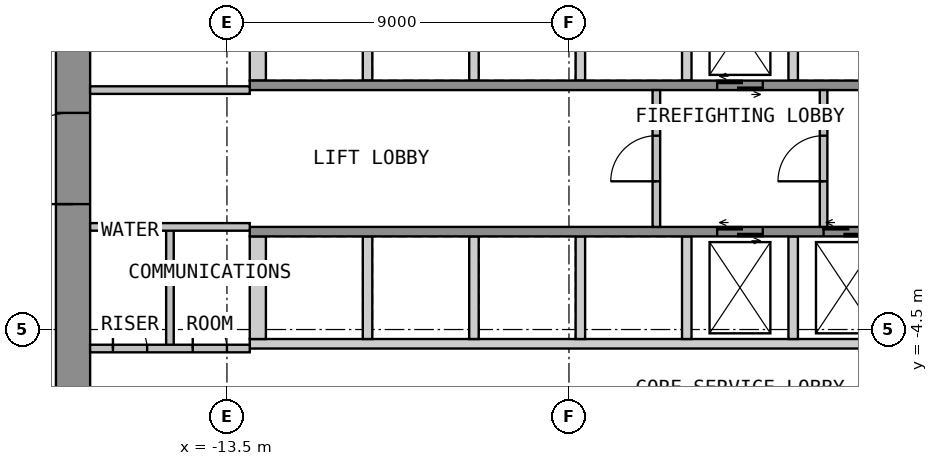
"""IFC4 building model, lengths in metres.
Left out: names, types, materials, properties, quantities, classifications, styles, units other than length and angle.
Written with IfcOpenShell. Run it as: python <this file> out.ifc"""

import sys

from ifc_helpers import new_model, si_unit, direction, frame, frame_2d, origin, place, context, subcontext, project, spatial, polyline, rectangle, outline, extrude, element, fill, save


model = new_model("IFC4")
c1 = context("Model", 3, precision=1e-05, world=origin(), true_north=direction((0.0, 1.0)))
c2 = subcontext(c1, "Body", "Model", "MODEL_VIEW")
j1 = project(units=[si_unit("LENGTHUNIT", "METRE"), si_unit("PLANEANGLEUNIT", "RADIAN")], contexts=[c1])
p1 = place(None, origin())
s1 = spatial("IfcSite", under=j1, at=p1, CompositionType="ELEMENT")
p2 = place(p1, origin())
s2 = spatial("IfcBuilding", under=s1, at=p2, CompositionType="ELEMENT")
p3 = place(p2, frame((0.0, 0.0, -5.0)))
s3 = spatial("IfcBuildingStorey", under=s2, at=p3, CompositionType="ELEMENT", Elevation=-5.0)
p4 = place(p3, frame((-17.55, -12.6, 0.0), z_axis=(0.0, 0.0, 1.0), x_axis=(0.0, 1.0, 0.0)))
e1 = element("IfcWall", 1, at=p4, inside=s3, PredefinedType="SHEAR", context=c2, shape_type="SweptSolid", body=[
    extrude(rectangle(XDim=25.2, YDim=0.9, at=frame_2d((12.6, 0.0))), origin(), (0.0, 0.0, 1.0), 4.55),
])
p5 = place(p4, frame((11.4, 0.0, 0.0)))
e2 = element("IfcOpeningElement", 2, at=p5, cuts=e1, PredefinedType="OPENING", context=c2, shape_type="SweptSolid", body=[
    extrude(rectangle(XDim=2.4, YDim=2.1, at=frame_2d((1.2, 1.05))), frame((0.0, 0.46, 0.0), z_axis=(0.0, -1.0, 0.0), x_axis=(1.0, 0.0, 0.0)), (0.0, 0.0, 1.0), 0.92),
])
p6 = place(p3, origin())
e3 = element("IfcWall", 3, at=p6, inside=s3, PredefinedType="SHEAR", context=c2, shape_type="SweptSolid", body=[
    extrude(outline(polyline([(-12.9, 2.05), (-12.475, 2.05), (-12.475, 4.75), (-12.9, 4.75), (-12.9, 2.05)])), origin(), (0.0, 0.0, 1.0), 4.55),
])
p7 = place(p3, origin())
e4 = element("IfcWall", 4, at=p7, inside=s3, PredefinedType="SHEAR", context=c2, shape_type="SweptSolid", body=[
    extrude(outline(polyline([(-9.925, 2.05), (-9.675, 2.05), (-9.675, 4.75), (-9.925, 4.75), (-9.925, 2.05)])), origin(), (0.0, 0.0, 1.0), 4.55),
])
p8 = place(p3, origin())
e5 = element("IfcWall", 5, at=p8, inside=s3, PredefinedType="SHEAR", context=c2, shape_type="SweptSolid", body=[
    extrude(outline(polyline([(-7.125, 2.05), (-6.875, 2.05), (-6.875, 4.75), (-7.125, 4.75), (-7.125, 2.05)])), origin(), (0.0, 0.0, 1.0), 4.55),
])
p9 = place(p3, origin())
e6 = element("IfcWall", 6, at=p9, inside=s3, PredefinedType="SHEAR", context=c2, shape_type="SweptSolid", body=[
    extrude(outline(polyline([(-4.325, 2.05), (-4.075, 2.05), (-4.075, 4.75), (-4.325, 4.75), (-4.325, 2.05)])), origin(), (0.0, 0.0, 1.0), 4.55),
])
p10 = place(p3, origin())
e7 = element("IfcWall", 7, at=p10, inside=s3, PredefinedType="SHEAR", context=c2, shape_type="SweptSolid", body=[
    extrude(outline(polyline([(-1.525, 2.05), (-1.275, 2.05), (-1.275, 4.75), (-1.525, 4.75), (-1.525, 2.05)])), origin(), (0.0, 0.0, 1.0), 4.55),
])
p11 = place(p3, origin())
e8 = element("IfcWall", 8, at=p11, inside=s3, PredefinedType="SHEAR", context=c2, shape_type="SweptSolid", body=[
    extrude(outline(polyline([(1.275, 2.05), (1.525, 2.05), (1.525, 4.75), (1.275, 4.75), (1.275, 2.05)])), origin(), (0.0, 0.0, 1.0), 4.55),
])
p12 = place(p3, frame((-12.9, 1.925, 0.0), z_axis=(0.0, 0.0, 1.0), x_axis=(1.0, 0.0, 0.0)))
e9 = element("IfcWall", 9, at=p12, inside=s3, PredefinedType="SHEAR", context=c2, shape_type="SweptSolid", body=[
    extrude(rectangle(XDim=25.8, YDim=0.25, at=frame_2d((12.9, 0.0))), origin(), (0.0, 0.0, 1.0), 4.55),
])
p13 = place(p12, frame((12.3, 0.0, 0.0)))
e10 = element("IfcOpeningElement", 10, at=p13, cuts=e9, PredefinedType="OPENING", context=c2, shape_type="SweptSolid", body=[
    extrude(rectangle(XDim=1.2, YDim=2.1, at=frame_2d((0.6, 1.05))), frame((0.0, 0.135, 0.0), z_axis=(0.0, -1.0, 0.0), x_axis=(1.0, 0.0, 0.0)), (0.0, 0.0, 1.0), 0.27),
])
p14 = place(p12, frame((23.5, 0.0, 0.0)))
e11 = element("IfcOpeningElement", 11, at=p14, cuts=e9, PredefinedType="OPENING", context=c2, shape_type="SweptSolid", body=[
    extrude(rectangle(XDim=1.2, YDim=2.1, at=frame_2d((0.6, 1.05))), frame((0.0, 0.135, 0.0), z_axis=(0.0, -1.0, 0.0), x_axis=(1.0, 0.0, 0.0)), (0.0, 0.0, 1.0), 0.27),
])
p15 = place(p3, origin())
e12 = element("IfcWall", 12, at=p15, inside=s3, PredefinedType="SHEAR", context=c2, shape_type="SweptSolid", body=[
    extrude(outline(polyline([(-12.9, -5.0), (12.9, -5.0), (12.9, -4.75), (-12.9, -4.75), (-12.9, -5.0)])), origin(), (0.0, 0.0, 1.0), 4.55),
])
p16 = place(p3, origin())
e13 = element("IfcWall", 13, at=p16, inside=s3, PredefinedType="SHEAR", context=c2, shape_type="SweptSolid", body=[
    extrude(outline(polyline([(-12.9, -4.75), (-12.475, -4.75), (-12.475, -2.05), (-12.9, -2.05), (-12.9, -4.75)])), origin(), (0.0, 0.0, 1.0), 4.55),
])
p17 = place(p3, origin())
e14 = element("IfcWall", 14, at=p17, inside=s3, PredefinedType="SHEAR", context=c2, shape_type="SweptSolid", body=[
    extrude(outline(polyline([(-9.925, -4.75), (-9.675, -4.75), (-9.675, -2.05), (-9.925, -2.05), (-9.925, -4.75)])), origin(), (0.0, 0.0, 1.0), 4.55),
])
p18 = place(p3, origin())
e15 = element("IfcWall", 15, at=p18, inside=s3, PredefinedType="SHEAR", context=c2, shape_type="SweptSolid", body=[
    extrude(outline(polyline([(-7.125, -4.75), (-6.875, -4.75), (-6.875, -2.05), (-7.125, -2.05), (-7.125, -4.75)])), origin(), (0.0, 0.0, 1.0), 4.55),
])
p19 = place(p3, origin())
e16 = element("IfcWall", 16, at=p19, inside=s3, PredefinedType="SHEAR", context=c2, shape_type="SweptSolid", body=[
    extrude(outline(polyline([(-4.325, -4.75), (-4.075, -4.75), (-4.075, -2.05), (-4.325, -2.05), (-4.325, -4.75)])), origin(), (0.0, 0.0, 1.0), 4.55),
])
p20 = place(p3, origin())
e17 = element("IfcWall", 17, at=p20, inside=s3, PredefinedType="SHEAR", context=c2, shape_type="SweptSolid", body=[
    extrude(outline(polyline([(-1.525, -4.75), (-1.275, -4.75), (-1.275, -2.05), (-1.525, -2.05), (-1.525, -4.75)])), origin(), (0.0, 0.0, 1.0), 4.55),
])
p21 = place(p3, origin())
e18 = element("IfcWall", 18, at=p21, inside=s3, PredefinedType="SHEAR", context=c2, shape_type="SweptSolid", body=[
    extrude(outline(polyline([(1.275, -4.75), (1.525, -4.75), (1.525, -2.05), (1.275, -2.05), (1.275, -4.75)])), origin(), (0.0, 0.0, 1.0), 4.55),
])
p22 = place(p3, frame((-12.9, -1.925, 0.0), z_axis=(0.0, 0.0, 1.0), x_axis=(1.0, 0.0, 0.0)))
e19 = element("IfcWall", 19, at=p22, inside=s3, PredefinedType="SHEAR", context=c2, shape_type="SweptSolid", body=[
    extrude(rectangle(XDim=25.8, YDim=0.25, at=frame_2d((12.9, 0.0))), origin(), (0.0, 0.0, 1.0), 4.55),
])
p23 = place(p22, frame((12.3, 0.0, 0.0)))
e20 = element("IfcOpeningElement", 20, at=p23, cuts=e19, PredefinedType="OPENING", context=c2, shape_type="SweptSolid", body=[
    extrude(rectangle(XDim=1.2, YDim=2.1, at=frame_2d((0.6, 1.05))), frame((0.0, 0.135, 0.0), z_axis=(0.0, -1.0, 0.0), x_axis=(1.0, 0.0, 0.0)), (0.0, 0.0, 1.0), 0.27),
])
p24 = place(p22, frame((15.1, 0.0, 0.0)))
e21 = element("IfcOpeningElement", 21, at=p24, cuts=e19, PredefinedType="OPENING", context=c2, shape_type="SweptSolid", body=[
    extrude(rectangle(XDim=1.2, YDim=2.1, at=frame_2d((0.6, 1.05))), frame((0.0, 0.135, 0.0), z_axis=(0.0, -1.0, 0.0), x_axis=(1.0, 0.0, 0.0)), (0.0, 0.0, 1.0), 0.27),
])
p25 = place(p3, frame((-2.2, -1.8, 0.0), z_axis=(0.0, 0.0, 1.0), x_axis=(0.0, 1.0, 0.0)))
e22 = element("IfcWall", 22, at=p25, inside=s3, PredefinedType="PARTITIONING", context=c2, shape_type="SweptSolid", body=[
    extrude(rectangle(XDim=3.6, YDim=0.2, at=frame_2d((1.8, 0.0))), origin(), (0.0, 0.0, 1.0), 4.55),
])
p26 = place(p25, frame((1.2, 0.0, 0.0)))
e23 = element("IfcOpeningElement", 23, at=p26, cuts=e22, PredefinedType="OPENING", context=c2, shape_type="SweptSolid", body=[
    extrude(rectangle(XDim=1.2, YDim=2.1, at=frame_2d((0.6, 1.05))), frame((0.0, 0.11, 0.0), z_axis=(0.0, -1.0, 0.0), x_axis=(1.0, 0.0, 0.0)), (0.0, 0.0, 1.0), 0.22),
])
p27 = place(p3, frame((2.2, -1.8, 0.0), z_axis=(0.0, 0.0, 1.0), x_axis=(0.0, 1.0, 0.0)))
e24 = element("IfcWall", 24, at=p27, inside=s3, PredefinedType="PARTITIONING", context=c2, shape_type="SweptSolid", body=[
    extrude(rectangle(XDim=3.6, YDim=0.2, at=frame_2d((1.8, 0.0))), origin(), (0.0, 0.0, 1.0), 4.55),
])
p28 = place(p27, frame((1.2, 0.0, 0.0)))
e25 = element("IfcOpeningElement", 25, at=p28, cuts=e24, PredefinedType="OPENING", context=c2, shape_type="SweptSolid", body=[
    extrude(rectangle(XDim=1.2, YDim=2.1, at=frame_2d((0.6, 1.05))), frame((0.0, 0.11, 0.0), z_axis=(0.0, -1.0, 0.0), x_axis=(1.0, 0.0, 0.0)), (0.0, 0.0, 1.0), 0.22),
])
p29 = place(p3, frame((-17.1, 1.8, 0.0), z_axis=(0.0, 0.0, 1.0), x_axis=(1.0, 0.0, 0.0)))
e26 = element("IfcWall", 26, at=p29, inside=s3, PredefinedType="PARTITIONING", context=c2, shape_type="SweptSolid", body=[
    extrude(rectangle(XDim=4.2, YDim=0.2, at=frame_2d((2.1, 0.0))), origin(), (0.0, 0.0, 1.0), 4.55),
])
p30 = place(p3, frame((-15.0, -5.0, 0.0), z_axis=(0.0, 0.0, 1.0), x_axis=(0.0, 1.0, 0.0)))
e27 = element("IfcWall", 27, at=p30, inside=s3, PredefinedType="PARTITIONING", context=c2, shape_type="SweptSolid", body=[
    extrude(rectangle(XDim=3.2, YDim=0.2, at=frame_2d((1.6, 0.0))), origin(), (0.0, 0.0, 1.0), 4.55),
])
p31 = place(p3, frame((-17.1, -5.0, 0.0), z_axis=(0.0, 0.0, 1.0), x_axis=(1.0, 0.0, 0.0)))
e28 = element("IfcWall", 28, at=p31, inside=s3, PredefinedType="PARTITIONING", context=c2, shape_type="SweptSolid", body=[
    extrude(rectangle(XDim=4.2, YDim=0.2, at=frame_2d((2.1, 0.0))), origin(), (0.0, 0.0, 1.0), 4.55),
])
p32 = place(p31, frame((0.6, 0.0, 0.0)))
e29 = element("IfcOpeningElement", 29, at=p32, cuts=e28, PredefinedType="OPENING", context=c2, shape_type="SweptSolid", body=[
    extrude(rectangle(XDim=0.9, YDim=2.1, at=frame_2d((0.45, 1.05))), frame((0.0, 0.11, 0.0), z_axis=(0.0, -1.0, 0.0), x_axis=(1.0, 0.0, 0.0)), (0.0, 0.0, 1.0), 0.22),
])
p33 = place(p31, frame((2.7, 0.0, 0.0)))
e30 = element("IfcOpeningElement", 30, at=p33, cuts=e28, PredefinedType="OPENING", context=c2, shape_type="SweptSolid", body=[
    extrude(rectangle(XDim=0.9, YDim=2.1, at=frame_2d((0.45, 1.05))), frame((0.0, 0.11, 0.0), z_axis=(0.0, -1.0, 0.0), x_axis=(1.0, 0.0, 0.0)), (0.0, 0.0, 1.0), 0.22),
])
p34 = place(p3, frame((-17.1, -1.8, 0.0), z_axis=(0.0, 0.0, 1.0), x_axis=(1.0, 0.0, 0.0)))
e31 = element("IfcWall", 31, at=p34, inside=s3, PredefinedType="PARTITIONING", context=c2, shape_type="SweptSolid", body=[
    extrude(rectangle(XDim=4.2, YDim=0.2, at=frame_2d((2.1, 0.0))), origin(), (0.0, 0.0, 1.0), 4.55),
])
p35 = place(p5, origin())
e32 = element("IfcDoor", 32, at=p35, inside=s3, OperationType="DOUBLE_DOOR_DOUBLE_SWING", PredefinedType="DOOR", context=c2, shape_type="SweptSolid", body=[
    extrude(rectangle(XDim=2.4, YDim=2.1, at=frame_2d((1.2, 1.05))), frame((0.0, 0.025, 0.0), z_axis=(0.0, -1.0, 0.0), x_axis=(1.0, 0.0, 0.0)), (0.0, 0.0, 1.0), 0.05),
])
fill(e2, e32)
p36 = place(p13, origin())
e33 = element("IfcDoor", 33, at=p36, inside=s3, OperationType="DOUBLE_DOOR_SLIDING", PredefinedType="DOOR", context=c2, shape_type="SweptSolid", body=[
    extrude(rectangle(XDim=1.2, YDim=2.1, at=frame_2d((0.6, 1.05))), frame((0.0, 0.025, 0.0), z_axis=(0.0, -1.0, 0.0), x_axis=(1.0, 0.0, 0.0)), (0.0, 0.0, 1.0), 0.05),
])
fill(e10, e33)
p37 = place(p23, origin())
e34 = element("IfcDoor", 34, at=p37, inside=s3, OperationType="DOUBLE_DOOR_SLIDING", PredefinedType="DOOR", context=c2, shape_type="SweptSolid", body=[
    extrude(rectangle(XDim=1.2, YDim=2.1, at=frame_2d((0.6, 1.05))), frame((0.0, 0.025, 0.0), z_axis=(0.0, -1.0, 0.0), x_axis=(1.0, 0.0, 0.0)), (0.0, 0.0, 1.0), 0.05),
])
fill(e20, e34)
p38 = place(p24, origin())
e35 = element("IfcDoor", 35, at=p38, inside=s3, OperationType="DOUBLE_DOOR_SLIDING", PredefinedType="DOOR", context=c2, shape_type="SweptSolid", body=[
    extrude(rectangle(XDim=1.2, YDim=2.1, at=frame_2d((0.6, 1.05))), frame((0.0, 0.025, 0.0), z_axis=(0.0, -1.0, 0.0), x_axis=(1.0, 0.0, 0.0)), (0.0, 0.0, 1.0), 0.05),
])
fill(e21, e35)
p39 = place(p26, origin())
e36 = element("IfcDoor", 36, at=p39, inside=s3, OperationType="SINGLE_SWING_LEFT", PredefinedType="DOOR", context=c2, shape_type="SweptSolid", body=[
    extrude(rectangle(XDim=1.2, YDim=2.1, at=frame_2d((0.6, 1.05))), frame((0.0, 0.025, 0.0), z_axis=(0.0, -1.0, 0.0), x_axis=(1.0, 0.0, 0.0)), (0.0, 0.0, 1.0), 0.05),
])
fill(e23, e36)
p40 = place(p28, origin())
e37 = element("IfcDoor", 37, at=p40, inside=s3, OperationType="SINGLE_SWING_LEFT", PredefinedType="DOOR", context=c2, shape_type="SweptSolid", body=[
    extrude(rectangle(XDim=1.2, YDim=2.1, at=frame_2d((0.6, 1.05))), frame((0.0, 0.025, 0.0), z_axis=(0.0, -1.0, 0.0), x_axis=(1.0, 0.0, 0.0)), (0.0, 0.0, 1.0), 0.05),
])
fill(e25, e37)
p41 = place(p32, origin())
e38 = element("IfcDoor", 38, at=p41, inside=s3, OperationType="SINGLE_SWING_LEFT", PredefinedType="DOOR", context=c2, shape_type="SweptSolid", body=[
    extrude(rectangle(XDim=0.9, YDim=2.1, at=frame_2d((0.45, 1.05))), frame((0.0, 0.025, 0.0), z_axis=(0.0, -1.0, 0.0), x_axis=(1.0, 0.0, 0.0)), (0.0, 0.0, 1.0), 0.05),
])
fill(e29, e38)
p42 = place(p33, origin())
e39 = element("IfcDoor", 39, at=p42, inside=s3, OperationType="SINGLE_SWING_LEFT", PredefinedType="DOOR", context=c2, shape_type="SweptSolid", body=[
    extrude(rectangle(XDim=0.9, YDim=2.1, at=frame_2d((0.45, 1.05))), frame((0.0, 0.025, 0.0), z_axis=(0.0, -1.0, 0.0), x_axis=(1.0, 0.0, 0.0)), (0.0, 0.0, 1.0), 0.05),
])
fill(e30, e39)
save(model, sys.argv[1])
